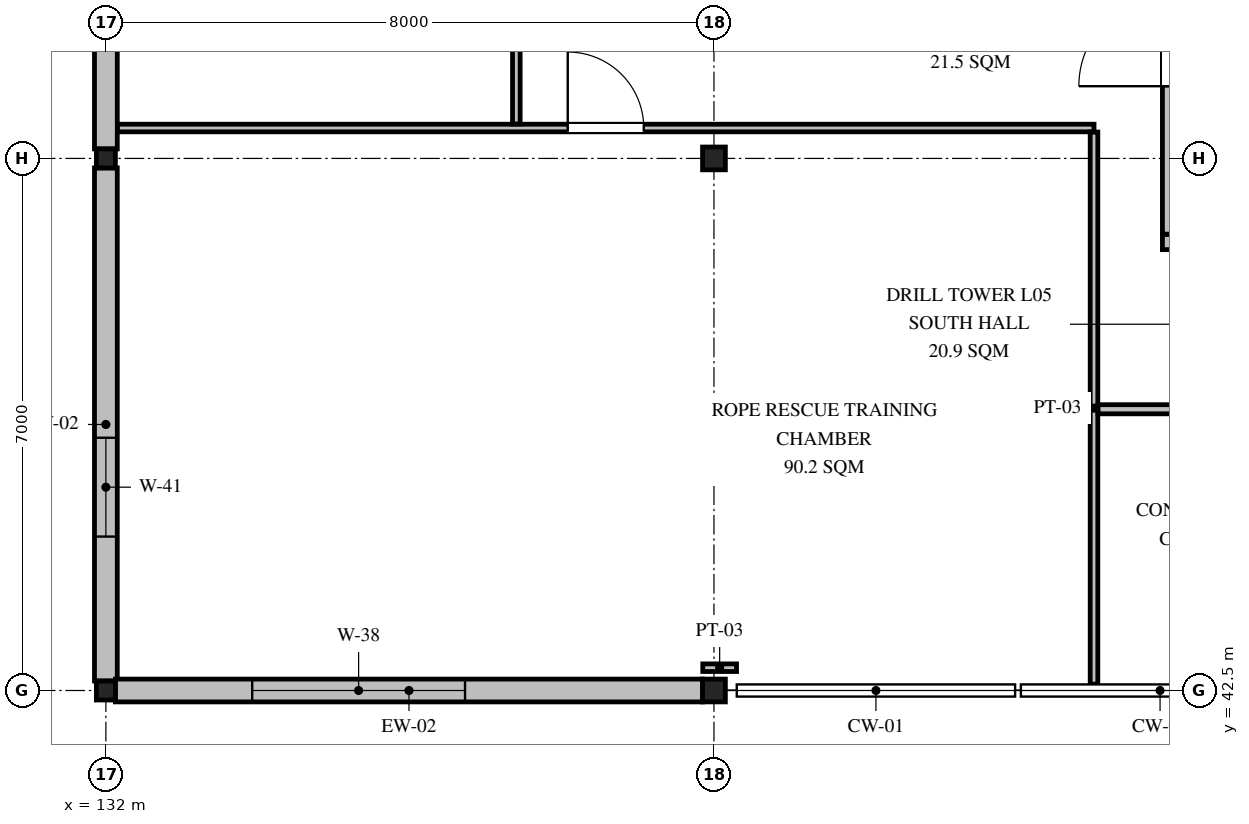
"""IFC4 building model, lengths in metres.
Left out: names, types, materials, properties, quantities, classifications, styles, units other than length and angle.
Written with IfcOpenShell. Run it as: python <this file> out.ifc"""

import sys

from ifc_helpers import new_model, si_unit, direction, frame, frame_2d, origin, origin_2d, place, context, subcontext, project, spatial, rectangle, i_section, extrude, element, fill, save


model = new_model("IFC4")
c1 = context("Model", 3, precision=1e-05, world=origin(), true_north=direction((0.0, 1.0)))
c2 = subcontext(c1, "Body", "Model", "MODEL_VIEW")
j1 = project(units=[si_unit("LENGTHUNIT", "METRE"), si_unit("PLANEANGLEUNIT", "RADIAN")], contexts=[c1])
p1 = place(None, origin())
s1 = spatial("IfcSite", under=j1, at=p1, CompositionType="ELEMENT")
p2 = place(p1, origin())
s2 = spatial("IfcBuilding", under=s1, at=p2, CompositionType="ELEMENT")
p3 = place(p2, frame((0.0, 0.0, 18.45)))
s3 = spatial("IfcBuildingStorey", under=s2, at=p3, CompositionType="ELEMENT", Elevation=18.45)
for number, where, z_axis, x_axis in (
    (1, (132.0, 42.5, 0.0), (0.0, 0.0, 1.0), (1.0, 0.0, 0.0)),
    (2, (132.0, 49.5, 0.0), (0.0, 0.0, 1.0), (1.0, 0.0, 0.0)),
):
    element("IfcColumn", number, at=place(p3, frame(where, z_axis=z_axis, x_axis=x_axis)), inside=s3, PredefinedType="COLUMN", context=c2, shape_type="SweptSolid", body=[
        extrude(i_section(OverallWidth=0.25, OverallDepth=0.25, WebThickness=0.009, FlangeThickness=0.014, FilletRadius=0.016, at=origin_2d()), origin(), (0.0, 0.0, 1.0), 4.2),
    ])
for number, where, z_axis, x_axis in (
    (3, (140.0, 42.5, 0.0), (0.0, 0.0, 1.0), (1.0, 0.0, 0.0)),
    (4, (140.0, 49.5, 0.0), (0.0, 0.0, 1.0), (1.0, 0.0, 0.0)),
):
    element("IfcColumn", number, at=place(p3, frame(where, z_axis=z_axis, x_axis=x_axis)), inside=s3, PredefinedType="COLUMN", context=c2, shape_type="SweptSolid", body=[
        extrude(i_section(OverallWidth=0.3, OverallDepth=0.3, WebThickness=0.01, FlangeThickness=0.015, FilletRadius=0.018, at=origin_2d()), origin(), (0.0, 0.0, 1.0), 4.2),
    ])
p4 = place(p3, frame((132.0, 42.625, 0.0), z_axis=(0.0, 0.0, 1.0), x_axis=(0.0, 1.0, 0.0)))
e5 = element("IfcWall", 5, at=p4, inside=s3, PredefinedType="SOLIDWALL", context=c2, shape_type="SweptSolid", body=[
    extrude(rectangle(XDim=6.75, YDim=0.3, at=frame_2d((3.375, 0.0))), origin(), (0.0, 0.0, 1.0), 3.494),
])
p5 = place(p4, frame((1.9, 0.0, 0.85)))
e6 = element("IfcOpeningElement", 6, at=p5, cuts=e5, PredefinedType="OPENING", context=c2, shape_type="SweptSolid", body=[
    extrude(rectangle(XDim=1.3, YDim=1.3, at=frame_2d((0.65, 0.65))), frame((0.0, 0.16, 0.0), z_axis=(0.0, -1.0, 0.0), x_axis=(1.0, 0.0, 0.0)), (0.0, 0.0, 1.0), 0.32),
])
p6 = place(p3, frame((132.0, 49.625, 0.0), z_axis=(0.0, 0.0, 1.0), x_axis=(0.0, 1.0, 0.0)))
e7 = element("IfcWall", 7, at=p6, inside=s3, PredefinedType="SOLIDWALL", context=c2, shape_type="SweptSolid", body=[
    extrude(rectangle(XDim=6.75, YDim=0.3, at=frame_2d((3.375, 0.0))), origin(), (0.0, 0.0, 1.0), 3.544),
])
p7 = place(p6, frame((3.3, 0.0, 1.05)))
e8 = element("IfcOpeningElement", 8, at=p7, cuts=e7, PredefinedType="OPENING", context=c2, shape_type="SweptSolid", body=[
    extrude(rectangle(XDim=0.95, YDim=0.95, at=frame_2d((0.475, 0.475))), frame((0.0, 0.16, 0.0), z_axis=(0.0, -1.0, 0.0), x_axis=(1.0, 0.0, 0.0)), (0.0, 0.0, 1.0), 0.32),
])
p8 = place(p3, frame((132.125, 42.5, 0.0), z_axis=(0.0, 0.0, 1.0), x_axis=(1.0, 0.0, 0.0)))
e9 = element("IfcWall", 9, at=p8, inside=s3, PredefinedType="SOLIDWALL", context=c2, shape_type="SweptSolid", body=[
    extrude(rectangle(XDim=7.725, YDim=0.3, at=frame_2d((3.863, 0.0))), origin(), (0.0, 0.0, 1.0), 3.494),
])
p9 = place(p8, frame((1.8, 0.0, 0.9)))
e10 = element("IfcOpeningElement", 10, at=p9, cuts=e9, PredefinedType="OPENING", context=c2, shape_type="SweptSolid", body=[
    extrude(rectangle(XDim=2.8, YDim=1.2, at=frame_2d((1.4, 0.6))), frame((0.0, 0.16, 0.0), z_axis=(0.0, -1.0, 0.0), x_axis=(1.0, 0.0, 0.0)), (0.0, 0.0, 1.0), 0.32),
])
p10 = place(p3, frame((145.9, 48.4, 0.0), z_axis=(0.0, 0.0, 1.0), x_axis=(1.0, 0.0, 0.0)))
e11 = element("IfcWall", 11, at=p10, inside=s3, PredefinedType="PARTITIONING", context=c2, shape_type="SweptSolid", body=[
    extrude(rectangle(XDim=8.7, YDim=0.2, at=frame_2d((4.35, 0.0))), origin(), (0.0, 0.0, 1.0), 4.0),
])
p11 = place(p10, frame((4.3, 0.0, 0.0)))
e12 = element("IfcOpeningElement", 12, at=p11, cuts=e11, PredefinedType="OPENING", context=c2, shape_type="SweptSolid", body=[
    extrude(rectangle(XDim=1.2, YDim=2.15, at=frame_2d((0.6, 1.075))), frame((0.0, 0.11, 0.0), z_axis=(0.0, -1.0, 0.0), x_axis=(1.0, 0.0, 0.0)), (0.0, 0.0, 1.0), 0.22),
])
p12 = place(p3, frame((146.0, 48.504, 0.0), z_axis=(0.0, 0.0, 1.0), x_axis=(0.0, 1.0, 0.0)))
e13 = element("IfcWall", 13, at=p12, inside=s3, PredefinedType="PARTITIONING", context=c2, shape_type="SweptSolid", body=[
    extrude(rectangle(XDim=3.967, YDim=0.2, at=frame_2d((1.983, 0.0))), origin(), (0.0, 0.0, 1.0), 4.0),
])
p13 = place(p12, frame((1.946, 0.0, 0.0)))
e14 = element("IfcOpeningElement", 14, at=p13, cuts=e13, PredefinedType="OPENING", context=c2, shape_type="SweptSolid", body=[
    extrude(rectangle(XDim=1.2, YDim=2.15, at=frame_2d((0.6, 1.075))), frame((0.0, 0.11, 0.0), z_axis=(0.0, -1.0, 0.0), x_axis=(1.0, 0.0, 0.0)), (0.0, 0.0, 1.0), 0.22),
])
p14 = place(p3, frame((139.853, 42.8, 0.0), z_axis=(0.0, 0.0, 1.0), x_axis=(1.0, 0.0, 0.0)))
e15 = element("IfcWall", 15, at=p14, inside=s3, PredefinedType="PARTITIONING", context=c2, shape_type="SweptSolid", body=[
    extrude(rectangle(XDim=0.444, YDim=0.1, at=frame_2d((0.222, 0.0))), origin(), (0.0, 0.0, 1.0), 4.0),
])
p15 = place(p3, frame((132.153, 49.9, 0.0), z_axis=(0.0, 0.0, 1.0), x_axis=(1.0, 0.0, 0.0)))
e16 = element("IfcWall", 16, at=p15, inside=s3, PredefinedType="PARTITIONING", context=c2, shape_type="SweptSolid", body=[
    extrude(rectangle(XDim=12.847, YDim=0.1, at=frame_2d((6.423, 0.0))), origin(), (0.0, 0.0, 1.0), 4.0),
])
p16 = place(p15, frame((5.924, 0.0, 0.0)))
e17 = element("IfcOpeningElement", 17, at=p16, cuts=e16, PredefinedType="OPENING", context=c2, shape_type="SweptSolid", body=[
    extrude(rectangle(XDim=1.0, YDim=2.1, at=frame_2d((0.5, 1.05))), frame((0.0, 0.06, 0.0), z_axis=(0.0, -1.0, 0.0), x_axis=(1.0, 0.0, 0.0)), (0.0, 0.0, 1.0), 0.12),
])
p17 = place(p3, frame((145.0, 42.583, 0.0), z_axis=(0.0, 0.0, 1.0), x_axis=(0.0, 1.0, 0.0)))
e18 = element("IfcWall", 18, at=p17, inside=s3, PredefinedType="PARTITIONING", context=c2, shape_type="SweptSolid", body=[
    extrude(rectangle(XDim=7.264, YDim=0.1, at=frame_2d((3.632, 0.0))), origin(), (0.0, 0.0, 1.0), 4.0),
])
p18 = place(p3, frame((137.4, 49.953, 0.0), z_axis=(0.0, 0.0, 1.0), x_axis=(0.0, 1.0, 0.0)))
e19 = element("IfcWall", 19, at=p18, inside=s3, PredefinedType="PARTITIONING", context=c2, shape_type="SweptSolid", body=[
    extrude(rectangle(XDim=6.394, YDim=0.1, at=frame_2d((3.197, 0.0))), origin(), (0.0, 0.0, 1.0), 3.7),
])
p19 = place(p18, frame((2.622, 0.0, 0.0)))
e20 = element("IfcOpeningElement", 20, at=p19, cuts=e19, PredefinedType="OPENING", context=c2, shape_type="SweptSolid", body=[
    extrude(rectangle(XDim=1.15, YDim=2.1, at=frame_2d((0.575, 1.05))), frame((0.0, 0.06, 0.0), z_axis=(0.0, -1.0, 0.0), x_axis=(1.0, 0.0, 0.0)), (0.0, 0.0, 1.0), 0.12),
])
p20 = place(p3, frame((145.053, 46.2, 0.0), z_axis=(0.0, 0.0, 1.0), x_axis=(1.0, 0.0, 0.0)))
e21 = element("IfcWall", 21, at=p20, inside=s3, PredefinedType="PARTITIONING", context=c2, shape_type="SweptSolid", body=[
    extrude(rectangle(XDim=9.369, YDim=0.12, at=frame_2d((4.685, 0.0))), origin(), (0.0, 0.0, 1.0), 4.0),
])
p21 = place(p20, frame((4.185, 0.0, 0.0)))
e22 = element("IfcOpeningElement", 22, at=p21, cuts=e21, PredefinedType="OPENING", context=c2, shape_type="SweptSolid", body=[
    extrude(rectangle(XDim=1.0, YDim=2.1, at=frame_2d((0.5, 1.05))), frame((0.0, 0.07, 0.0), z_axis=(0.0, -1.0, 0.0), x_axis=(1.0, 0.0, 0.0)), (0.0, 0.0, 1.0), 0.14),
])
p22 = place(p5, origin())
e23 = element("IfcWindow", 23, at=p22, inside=s3, PartitioningType="SINGLE_PANEL", PredefinedType="WINDOW", context=c2, shape_type="SweptSolid", body=[
    extrude(rectangle(XDim=1.3, YDim=1.3, at=frame_2d((0.65, 0.65))), frame((0.0, 0.03, 0.0), z_axis=(0.0, -1.0, 0.0), x_axis=(1.0, 0.0, 0.0)), (0.0, 0.0, 1.0), 0.06),
])
fill(e6, e23)
p23 = place(p9, origin())
e24 = element("IfcWindow", 24, at=p23, inside=s3, PartitioningType="SINGLE_PANEL", PredefinedType="WINDOW", context=c2, shape_type="SweptSolid", body=[
    extrude(rectangle(XDim=2.8, YDim=1.2, at=frame_2d((1.4, 0.6))), frame((0.0, 0.03, 0.0), z_axis=(0.0, -1.0, 0.0), x_axis=(1.0, 0.0, 0.0)), (0.0, 0.0, 1.0), 0.06),
])
fill(e10, e24)
p24 = place(p13, origin())
e25 = element("IfcDoor", 25, at=p24, inside=s3, OperationType="SINGLE_SWING_LEFT", PredefinedType="DOOR", context=c2, shape_type="SweptSolid", body=[
    extrude(rectangle(XDim=1.2, YDim=2.15, at=frame_2d((0.6, 1.075))), frame((0.0, 0.025, 0.0), z_axis=(0.0, -1.0, 0.0), x_axis=(1.0, 0.0, 0.0)), (0.0, 0.0, 1.0), 0.05),
])
fill(e14, e25)
p25 = place(p16, origin())
e26 = element("IfcDoor", 26, at=p25, inside=s3, OperationType="SINGLE_SWING_LEFT", PredefinedType="DOOR", context=c2, shape_type="SweptSolid", body=[
    extrude(rectangle(XDim=1.0, YDim=2.1, at=frame_2d((0.5, 1.05))), frame((0.0, 0.025, 0.0), z_axis=(0.0, -1.0, 0.0), x_axis=(1.0, 0.0, 0.0)), (0.0, 0.0, 1.0), 0.05),
])
fill(e17, e26)
save(model, sys.argv[1])
